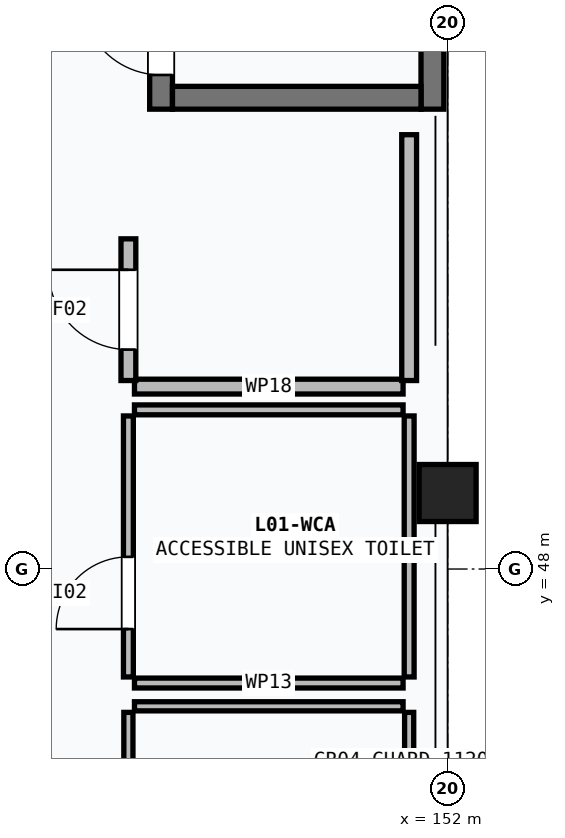
"""IFC4 building model, lengths in metres.
Left out: names, types, materials, properties, quantities, classifications, styles, units other than length and angle.
Written with IfcOpenShell. Run it as: python <this file> out.ifc"""

import sys

from ifc_helpers import new_model, si_unit, direction, frame, frame_2d, origin, origin_2d, place, context, subcontext, project, spatial, rectangle, extrude, element, fill, save


model = new_model("IFC4")
c1 = context("Model", 3, precision=1e-05, world=origin(), true_north=direction((0.0, 1.0)))
c2 = subcontext(c1, "Body", "Model", "MODEL_VIEW")
j1 = project(units=[si_unit("LENGTHUNIT", "METRE"), si_unit("PLANEANGLEUNIT", "RADIAN")], contexts=[c1])
p1 = place(None, origin())
s1 = spatial("IfcSite", under=j1, at=p1, CompositionType="ELEMENT")
p2 = place(p1, origin())
s2 = spatial("IfcBuilding", under=s1, at=p2, CompositionType="ELEMENT")
p3 = place(p2, frame((0.0, 0.0, 4.5)))
s3 = spatial("IfcBuildingStorey", under=s2, at=p3, CompositionType="ELEMENT", Elevation=4.5)
p4 = place(p3, frame((152.0, 49.0, 0.0), z_axis=(0.0, 0.0, 1.0), x_axis=(1.0, 0.0, 0.0)))
e1 = element("IfcColumn", 1, at=p4, inside=s3, PredefinedType="COLUMN", context=c2, shape_type="SweptSolid", body=[
    extrude(rectangle(XDim=0.75, YDim=0.75, at=origin_2d()), origin(), (0.0, 0.0, 1.0), 3.9),
])
p5 = place(p3, frame((148.23, 54.05, 0.0), z_axis=(0.0, 0.0, 1.0), x_axis=(0.0, 1.0, 0.0)))
e2 = element("IfcWall", 2, at=p5, inside=s3, PredefinedType="SHEAR", context=c2, shape_type="SweptSolid", body=[
    extrude(rectangle(XDim=9.9, YDim=0.3, at=frame_2d((4.95, 0.0))), origin(), (0.0, 0.0, 1.0), 3.9),
])
p6 = place(p5, frame((0.45, 0.0, 0.0)))
e3 = element("IfcOpeningElement", 3, at=p6, cuts=e2, PredefinedType="OPENING", context=c2, shape_type="SweptSolid", body=[
    extrude(rectangle(XDim=1.05, YDim=2.15, at=frame_2d((0.525, 1.075))), frame((0.0, 0.16, 0.0), z_axis=(0.0, -1.0, 0.0), x_axis=(1.0, 0.0, 0.0)), (0.0, 0.0, 1.0), 0.32),
])
p7 = place(p3, frame((151.8, 63.95, 0.0), z_axis=(0.0, 0.0, 1.0), x_axis=(0.0, -1.0, 0.0)))
e4 = element("IfcWall", 4, at=p7, inside=s3, PredefinedType="SHEAR", context=c2, shape_type="SweptSolid", body=[
    extrude(rectangle(XDim=9.9, YDim=0.3, at=frame_2d((4.95, 0.0))), origin(), (0.0, 0.0, 1.0), 3.9),
])
p8 = place(p3, frame((151.65, 54.2, 0.0), z_axis=(0.0, 0.0, 1.0), x_axis=(-1.0, 0.0, 0.0)))
e5 = element("IfcWall", 5, at=p8, inside=s3, PredefinedType="SHEAR", context=c2, shape_type="SweptSolid", body=[
    extrude(rectangle(XDim=3.27, YDim=0.3, at=frame_2d((1.635, 0.0))), origin(), (0.0, 0.0, 1.0), 3.9),
])
p9 = place(p3, frame((147.88, 46.194, 0.0), z_axis=(0.0, 0.0, 1.0), x_axis=(1.0, 0.0, 0.0)))
e6 = element("IfcWall", 6, at=p9, inside=s3, PredefinedType="PARTITIONING", context=c2, shape_type="SweptSolid", body=[
    extrude(rectangle(XDim=3.534, YDim=0.12, at=frame_2d((1.767, 0.0))), origin(), (0.0, 0.0, 1.0), 3.645),
])
p10 = place(p3, frame((147.8, 42.68, 0.0), z_axis=(0.0, 0.0, 1.0), x_axis=(0.0, 1.0, 0.0)))
e7 = element("IfcWall", 7, at=p10, inside=s3, PredefinedType="PARTITIONING", context=c2, shape_type="SweptSolid", body=[
    extrude(rectangle(XDim=3.434, YDim=0.12, at=frame_2d((1.717, 0.0))), origin(), (0.0, 0.0, 1.0), 3.055),
])
p11 = place(p10, frame((1.267, 0.0, 0.0)))
e8 = element("IfcOpeningElement", 8, at=p11, cuts=e7, PredefinedType="OPENING", context=c2, shape_type="SweptSolid", body=[
    extrude(rectangle(XDim=0.9, YDim=2.1, at=frame_2d((0.45, 1.05))), frame((0.0, 0.07, 0.0), z_axis=(0.0, -1.0, 0.0), x_axis=(1.0, 0.0, 0.0)), (0.0, 0.0, 1.0), 0.14),
])
p12 = place(p3, frame((151.494, 42.68, 0.0), z_axis=(0.0, 0.0, 1.0), x_axis=(0.0, 1.0, 0.0)))
e9 = element("IfcWall", 9, at=p12, inside=s3, PredefinedType="PARTITIONING", context=c2, shape_type="SweptSolid", body=[
    extrude(rectangle(XDim=3.434, YDim=0.12, at=frame_2d((1.717, 0.0))), origin(), (0.0, 0.0, 1.0), 3.055),
])
for number, where, z_axis, x_axis in (
    (10, (147.88, 46.5, 0.0), (0.0, 0.0, 1.0), (1.0, 0.0, 0.0)),
    (11, (147.88, 50.094, 0.0), (0.0, 0.0, 1.0), (1.0, 0.0, 0.0)),
):
    element("IfcWall", number, at=place(p3, frame(where, z_axis=z_axis, x_axis=x_axis)), inside=s3, PredefinedType="PARTITIONING", context=c2, shape_type="SweptSolid", body=[
        extrude(rectangle(XDim=3.534, YDim=0.13, at=frame_2d((1.767, 0.0))), origin(), (0.0, 0.0, 1.0), 3.645),
    ])
p13 = place(p3, frame((147.8, 46.58, 0.0), z_axis=(0.0, 0.0, 1.0), x_axis=(0.0, 1.0, 0.0)))
e12 = element("IfcWall", 12, at=p13, inside=s3, PredefinedType="PARTITIONING", context=c2, shape_type="SweptSolid", body=[
    extrude(rectangle(XDim=3.434, YDim=0.13, at=frame_2d((1.717, 0.0))), origin(), (0.0, 0.0, 1.0), 2.745),
])
p14 = place(p13, frame((0.63, 0.0, 0.0)))
e13 = element("IfcOpeningElement", 13, at=p14, cuts=e12, PredefinedType="OPENING", context=c2, shape_type="SweptSolid", body=[
    extrude(rectangle(XDim=0.95, YDim=2.1, at=frame_2d((0.475, 1.05))), frame((0.0, 0.075, 0.0), z_axis=(0.0, -1.0, 0.0), x_axis=(1.0, 0.0, 0.0)), (0.0, 0.0, 1.0), 0.15),
])
p15 = place(p3, frame((151.494, 46.58, 0.0), z_axis=(0.0, 0.0, 1.0), x_axis=(0.0, 1.0, 0.0)))
e14 = element("IfcWall", 14, at=p15, inside=s3, PredefinedType="PARTITIONING", context=c2, shape_type="SweptSolid", body=[
    extrude(rectangle(XDim=3.434, YDim=0.13, at=frame_2d((1.717, 0.0))), origin(), (0.0, 0.0, 1.0), 2.745),
])
p16 = place(p3, frame((147.88, 50.4, 0.0), z_axis=(0.0, 0.0, 1.0), x_axis=(1.0, 0.0, 0.0)))
e15 = element("IfcWall", 15, at=p16, inside=s3, PredefinedType="PARTITIONING", context=c2, shape_type="SweptSolid", body=[
    extrude(rectangle(XDim=3.534, YDim=0.195, at=frame_2d((1.767, 0.0))), origin(), (0.0, 0.0, 1.0), 3.645),
])
p17 = place(p3, frame((147.8, 50.48, 0.0), z_axis=(0.0, 0.0, 1.0), x_axis=(0.0, 1.0, 0.0)))
e16 = element("IfcWall", 16, at=p17, inside=s3, PredefinedType="PARTITIONING", context=c2, shape_type="SweptSolid", body=[
    extrude(rectangle(XDim=1.864, YDim=0.195, at=frame_2d((0.932, 0.0))), origin(), (0.0, 0.0, 1.0), 3.055),
])
p18 = place(p17, frame((0.407, 0.0, 0.0)))
e17 = element("IfcOpeningElement", 17, at=p18, cuts=e16, PredefinedType="OPENING", context=c2, shape_type="SweptSolid", body=[
    extrude(rectangle(XDim=1.05, YDim=2.15, at=frame_2d((0.525, 1.075))), frame((0.0, 0.107, 0.0), z_axis=(0.0, -1.0, 0.0), x_axis=(1.0, 0.0, 0.0)), (0.0, 0.0, 1.0), 0.215),
])
p19 = place(p3, frame((151.494, 50.48, 0.0), z_axis=(0.0, 0.0, 1.0), x_axis=(0.0, 1.0, 0.0)))
e18 = element("IfcWall", 18, at=p19, inside=s3, PredefinedType="PARTITIONING", context=c2, shape_type="SweptSolid", body=[
    extrude(rectangle(XDim=3.234, YDim=0.195, at=frame_2d((1.617, 0.0))), origin(), (0.0, 0.0, 1.0), 3.055),
])
p20 = place(p6, origin())
e19 = element("IfcDoor", 19, at=p20, inside=s3, OperationType="SINGLE_SWING_RIGHT", PredefinedType="DOOR", context=c2, shape_type="SweptSolid", body=[
    extrude(rectangle(XDim=1.05, YDim=2.15, at=frame_2d((0.525, 1.075))), frame((0.0, 0.025, 0.0), z_axis=(0.0, -1.0, 0.0), x_axis=(1.0, 0.0, 0.0)), (0.0, 0.0, 1.0), 0.05),
])
fill(e3, e19)
p21 = place(p14, origin())
e20 = element("IfcDoor", 20, at=p21, inside=s3, OperationType="SINGLE_SWING_LEFT", PredefinedType="DOOR", context=c2, shape_type="SweptSolid", body=[
    extrude(rectangle(XDim=0.95, YDim=2.1, at=frame_2d((0.475, 1.05))), frame((0.0, 0.025, 0.0), z_axis=(0.0, -1.0, 0.0), x_axis=(1.0, 0.0, 0.0)), (0.0, 0.0, 1.0), 0.05),
])
fill(e13, e20)
p22 = place(p18, origin())
e21 = element("IfcDoor", 21, at=p22, inside=s3, OperationType="SINGLE_SWING_RIGHT", PredefinedType="DOOR", context=c2, shape_type="SweptSolid", body=[
    extrude(rectangle(XDim=1.05, YDim=2.15, at=frame_2d((0.525, 1.075))), frame((0.0, 0.025, 0.0), z_axis=(0.0, -1.0, 0.0), x_axis=(1.0, 0.0, 0.0)), (0.0, 0.0, 1.0), 0.05),
])
fill(e17, e21)
save(model, sys.argv[1])
